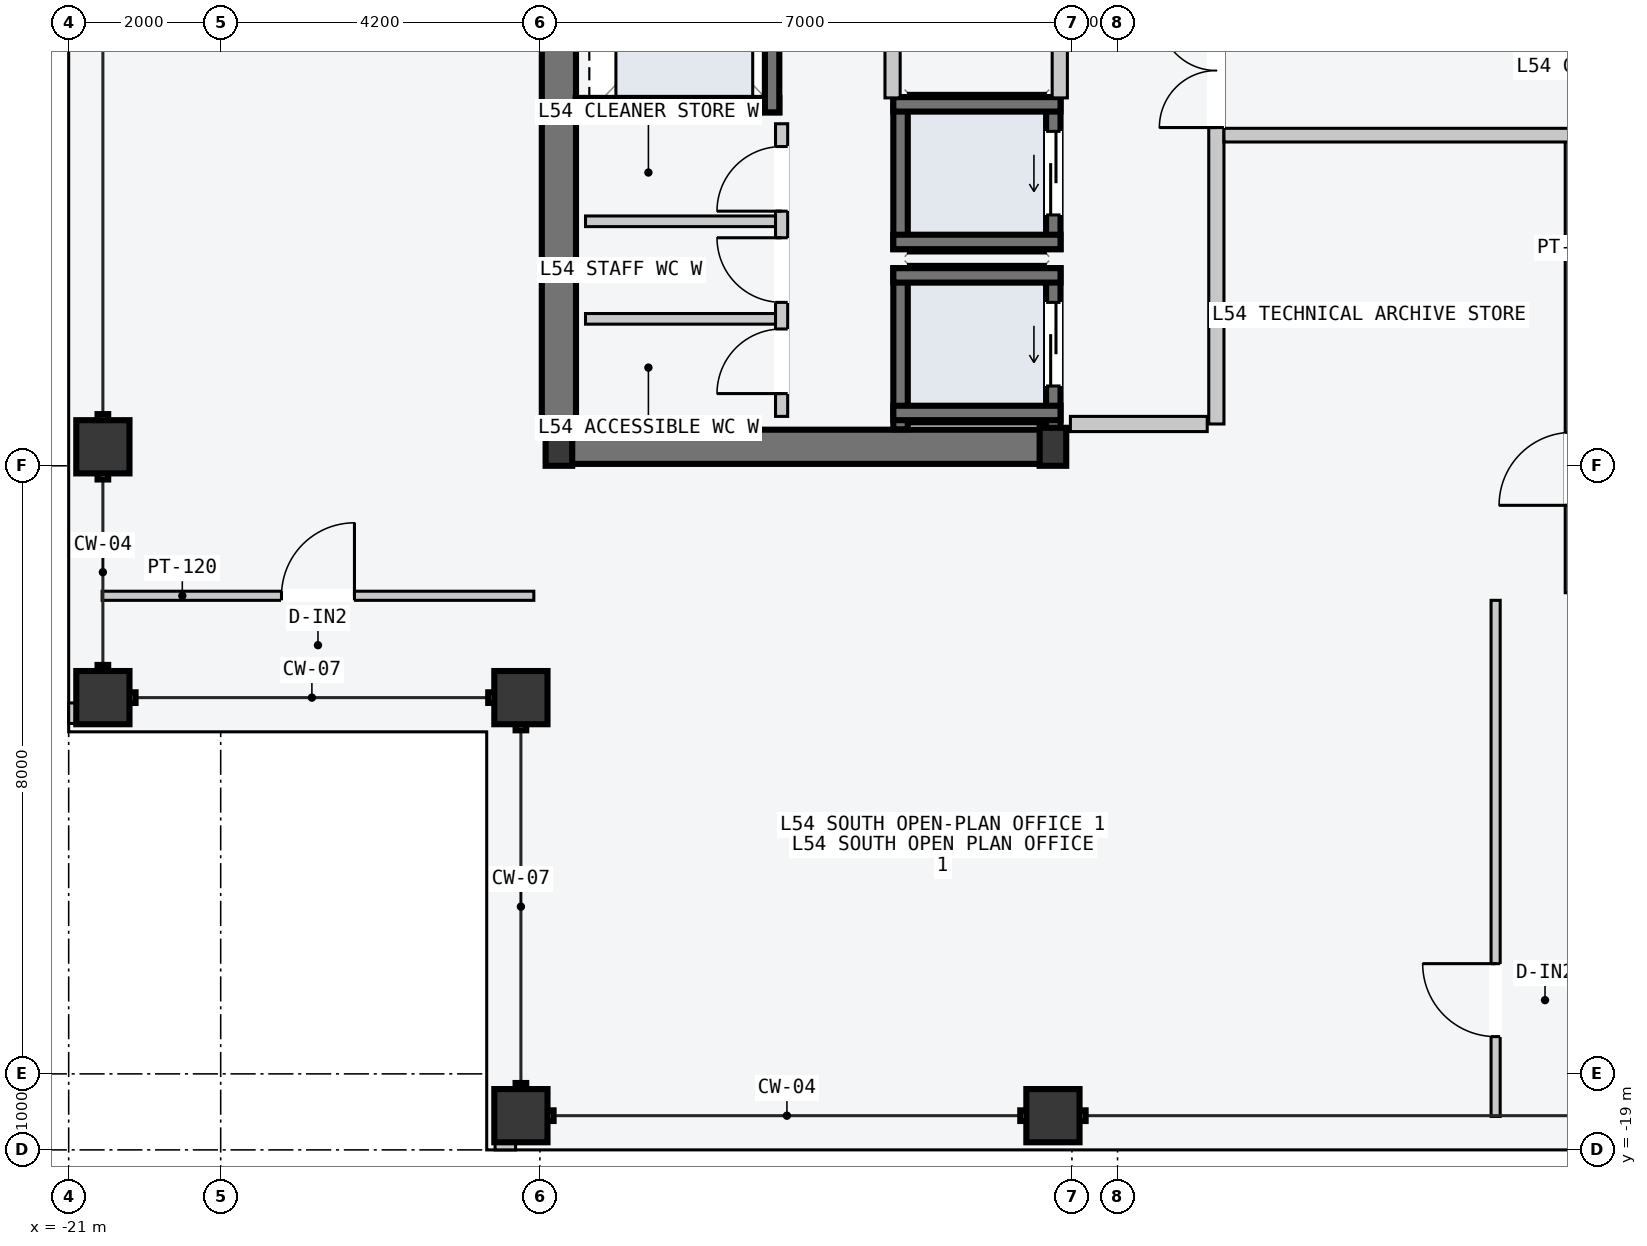
"""IFC4 building model, lengths in metres.
Left out: names, types, materials, properties, quantities, classifications, styles, units other than length and angle.
Written with IfcOpenShell. Run it as: python <this file> out.ifc"""

import sys

from ifc_helpers import new_model, si_unit, direction, frame, frame_2d, origin, origin_2d, place, context, subcontext, project, spatial, rectangle, hollow_rectangle, i_section, extrude, element, fill, save


model = new_model("IFC4")
c1 = context("Model", 3, precision=1e-05, world=origin(), true_north=direction((0.0, 1.0)))
c2 = subcontext(c1, "Body", "Model", "MODEL_VIEW")
j1 = project(units=[si_unit("LENGTHUNIT", "METRE"), si_unit("PLANEANGLEUNIT", "RADIAN")], contexts=[c1])
p1 = place(None, origin())
s1 = spatial("IfcSite", under=j1, at=p1, CompositionType="ELEMENT")
p2 = place(p1, origin())
s2 = spatial("IfcBuilding", under=s1, at=p2, CompositionType="ELEMENT")
p3 = place(p2, frame((0.0, 0.0, 205.5)))
s3 = spatial("IfcBuildingStorey", under=s2, at=p3, CompositionType="ELEMENT", Elevation=205.5)
p4 = place(p3, frame((-14.53, -9.75, -0.2), z_axis=(0.0, 0.0, 1.0), x_axis=(1.0, 0.0, 0.0)))
e1 = element("IfcWall", 1, at=p4, inside=s3, PredefinedType="SHEAR", context=c2, shape_type="SweptSolid", body=[
    extrude(rectangle(XDim=6.46, YDim=0.45, at=frame_2d((3.23, 0.0))), origin(), (0.0, 0.0, 1.0), 3.6),
])
p5 = place(p3, frame((-14.55, -9.5, -0.2), z_axis=(0.0, 0.0, 1.0), x_axis=(0.0, 1.0, 0.0)))
e2 = element("IfcWall", 2, at=p5, inside=s3, PredefinedType="SHEAR", context=c2, shape_type="SweptSolid", body=[
    extrude(rectangle(XDim=9.25, YDim=0.45, at=frame_2d((4.625, 0.0))), origin(), (0.0, 0.0, 1.0), 3.6),
])
for number, where, z_axis, x_axis in (
    (3, (-14.55, -9.75, 0.0), (0.0, 0.0, 1.0), (1.0, 0.0, 0.0)),
    (4, (-8.05, -9.75, 0.0), (0.0, 0.0, 1.0), (1.0, 0.0, 0.0)),
):
    element("IfcColumn", number, at=place(p3, frame(where, z_axis=z_axis, x_axis=x_axis)), inside=s3, PredefinedType="COLUMN", context=c2, shape_type="SweptSolid", body=[
        extrude(i_section(OverallWidth=0.35, OverallDepth=0.5, WebThickness=0.02, FlangeThickness=0.032, at=origin_2d()), origin(), (0.0, 0.0, 1.0), 3.6),
    ])
for number, where, z_axis, x_axis in (
    (5, (-15.05, -18.55, 0.0), (0.0, 0.0, 1.0), (1.0, 0.0, 0.0)),
    (6, (-8.05, -18.55, 0.0), (0.0, 0.0, 1.0), (1.0, 0.0, 0.0)),
    (7, (-20.55, -13.05, 0.0), (0.0, 0.0, 1.0), (0.0, 1.0, 0.0)),
    (8, (-20.55, -9.75, 0.0), (0.0, 0.0, 1.0), (0.0, 1.0, 0.0)),
    (9, (-15.05, -13.05, 0.0), (0.0, 0.0, 1.0), (1.0, 0.0, 0.0)),
):
    element("IfcColumn", number, at=place(p3, frame(where, z_axis=z_axis, x_axis=x_axis)), inside=s3, PredefinedType="COLUMN", context=c2, shape_type="SweptSolid", body=[
        extrude(hollow_rectangle(XDim=0.7, YDim=0.7, WallThickness=0.03, at=origin_2d()), origin(), (0.0, 0.0, 1.0), 3.6),
    ])
for number, where, z_axis, x_axis in (
    (10, (-15.39, -18.89, 0.0), (0.0, 0.0, 1.0), (1.0, 0.0, 0.0)),
    (11, (-20.89, -13.39, 0.0), (0.0, 0.0, 1.0), (0.0, 1.0, 0.0)),
):
    element("IfcWall", number, at=place(p3, frame(where, z_axis=z_axis, x_axis=x_axis)), inside=s3, PredefinedType="PARAPET", context=c2, shape_type="SweptSolid", body=[
        extrude(rectangle(XDim=0.27, YDim=0.22, at=frame_2d((0.135, 0.0))), origin(), (0.0, 0.0, 1.0), 1.2),
    ])
p6 = place(p3, frame((-8.045, -9.52, -0.2), z_axis=(0.0, 0.0, 1.0), x_axis=(0.0, 1.0, 0.0)))
e12 = element("IfcWall", 12, at=p6, inside=s3, PredefinedType="SOLIDWALL", context=c2, shape_type="SweptSolid", body=[
    extrude(rectangle(XDim=2.12, YDim=0.19, at=frame_2d((1.06, 0.0))), origin(), (0.0, 0.0, 1.0), 3.6),
])
p7 = place(p6, frame((0.57, 0.0, 0.2)))
e13 = element("IfcOpeningElement", 13, at=p7, cuts=e12, PredefinedType="OPENING", context=c2, shape_type="SweptSolid", body=[
    extrude(rectangle(XDim=1.1, YDim=2.2, at=frame_2d((0.55, 1.1))), frame((0.0, 0.105, 0.0), z_axis=(0.0, -1.0, 0.0), x_axis=(1.0, 0.0, 0.0)), (0.0, 0.0, 1.0), 0.21),
])
p8 = place(p3, frame((-10.055, -9.52, -0.2), z_axis=(0.0, 0.0, 1.0), x_axis=(0.0, 1.0, 0.0)))
e14 = element("IfcWall", 14, at=p8, inside=s3, PredefinedType="SOLIDWALL", context=c2, shape_type="SweptSolid", body=[
    extrude(rectangle(XDim=2.12, YDim=0.19, at=frame_2d((1.06, 0.0))), origin(), (0.0, 0.0, 1.0), 3.6),
])
for number, where, z_axis, x_axis in (
    (15, (-10.15, -7.495, -0.2), (0.0, 0.0, 1.0), (1.0, 0.0, 0.0)),
    (16, (-10.15, -9.305, -0.2), (0.0, 0.0, 1.0), (1.0, 0.0, 0.0)),
):
    element("IfcWall", number, at=place(p3, frame(where, z_axis=z_axis, x_axis=x_axis)), inside=s3, PredefinedType="SOLIDWALL", context=c2, shape_type="SweptSolid", body=[
        extrude(rectangle(XDim=2.2, YDim=0.19, at=frame_2d((1.1, 0.0))), origin(), (0.0, 0.0, 1.0), 3.6),
    ])
p9 = place(p3, frame((-8.045, -7.15, -0.2), z_axis=(0.0, 0.0, 1.0), x_axis=(0.0, 1.0, 0.0)))
e17 = element("IfcWall", 17, at=p9, inside=s3, PredefinedType="SOLIDWALL", context=c2, shape_type="SweptSolid", body=[
    extrude(rectangle(XDim=2.0, YDim=0.19, at=frame_2d((1.0, 0.0))), origin(), (0.0, 0.0, 1.0), 3.6),
])
p10 = place(p9, frame((0.45, 0.0, 0.2)))
e18 = element("IfcOpeningElement", 18, at=p10, cuts=e17, PredefinedType="OPENING", context=c2, shape_type="SweptSolid", body=[
    extrude(rectangle(XDim=1.1, YDim=2.2, at=frame_2d((0.55, 1.1))), frame((0.0, 0.105, 0.0), z_axis=(0.0, -1.0, 0.0), x_axis=(1.0, 0.0, 0.0)), (0.0, 0.0, 1.0), 0.21),
])
p11 = place(p3, frame((-10.055, -7.15, -0.2), z_axis=(0.0, 0.0, 1.0), x_axis=(0.0, 1.0, 0.0)))
e19 = element("IfcWall", 19, at=p11, inside=s3, PredefinedType="SOLIDWALL", context=c2, shape_type="SweptSolid", body=[
    extrude(rectangle(XDim=2.0, YDim=0.19, at=frame_2d((1.0, 0.0))), origin(), (0.0, 0.0, 1.0), 3.6),
])
for number, where, z_axis, x_axis in (
    (20, (-10.15, -5.245, -0.2), (0.0, 0.0, 1.0), (1.0, 0.0, 0.0)),
    (21, (-10.15, -7.055, -0.2), (0.0, 0.0, 1.0), (1.0, 0.0, 0.0)),
):
    element("IfcWall", number, at=place(p3, frame(where, z_axis=z_axis, x_axis=x_axis)), inside=s3, PredefinedType="SOLIDWALL", context=c2, shape_type="SweptSolid", body=[
        extrude(rectangle(XDim=2.2, YDim=0.19, at=frame_2d((1.1, 0.0))), origin(), (0.0, 0.0, 1.0), 3.6),
    ])
p12 = place(p3, frame((-14.33, -5.255, -0.2), z_axis=(0.0, 0.0, 1.0), x_axis=(1.0, 0.0, 0.0)))
e22 = element("IfcWall", 22, at=p12, inside=s3, PredefinedType="SOLIDWALL", context=c2, shape_type="SweptSolid", body=[
    extrude(rectangle(XDim=2.68, YDim=0.19, at=frame_2d((1.34, 0.0))), origin(), (0.0, 0.0, 1.0), 3.6),
])
p13 = place(p3, frame((-11.745, -5.35, -0.2), z_axis=(0.0, 0.0, 1.0), x_axis=(0.0, 1.0, 0.0)))
e23 = element("IfcWall", 23, at=p13, inside=s3, PredefinedType="SOLIDWALL", context=c2, shape_type="SweptSolid", body=[
    extrude(rectangle(XDim=2.6, YDim=0.19, at=frame_2d((1.3, 0.0))), origin(), (0.0, 0.0, 1.0), 3.6),
])
p14 = place(p3, frame((-5.9, -9.45, 0.0), z_axis=(0.0, 0.0, 1.0), x_axis=(0.0, 1.0, 0.0)))
e24 = element("IfcWall", 24, at=p14, inside=s3, PredefinedType="PARTITIONING", context=c2, shape_type="SweptSolid", body=[
    extrude(rectangle(XDim=10.5, YDim=0.2, at=frame_2d((5.25, 0.0))), origin(), (0.0, 0.0, 1.0), 3.4),
])
p15 = place(p14, frame((3.9, 0.0, 0.0)))
e25 = element("IfcOpeningElement", 25, at=p15, cuts=e24, PredefinedType="OPENING", context=c2, shape_type="SweptSolid", body=[
    extrude(rectangle(XDim=1.5, YDim=2.2, at=frame_2d((0.75, 1.1))), frame((0.0, 0.11, 0.0), z_axis=(0.0, -1.0, 0.0), x_axis=(1.0, 0.0, 0.0)), (0.0, 0.0, 1.0), 0.22),
])
p16 = place(p3, frame((-6.02, -9.45, 0.0), z_axis=(0.0, 0.0, 1.0), x_axis=(-1.0, 0.0, 0.0)))
e26 = element("IfcWall", 26, at=p16, inside=s3, PredefinedType="PARTITIONING", context=c2, shape_type="SweptSolid", body=[
    extrude(rectangle(XDim=1.8, YDim=0.2, at=frame_2d((0.9, 0.0))), origin(), (0.0, 0.0, 1.0), 3.4),
])
for number, where, z_axis, x_axis in (
    (27, (-7.96, -5.16, 0.0), (0.0, 0.0, 1.0), (0.0, 1.0, 0.0)),
    (28, (-10.16, -5.16, 0.0), (0.0, 0.0, 1.0), (0.0, 1.0, 0.0)),
):
    element("IfcWall", number, at=place(p3, frame(where, z_axis=z_axis, x_axis=x_axis)), inside=s3, PredefinedType="PARTITIONING", context=c2, shape_type="SweptSolid", body=[
        extrude(rectangle(XDim=2.44, YDim=0.2, at=frame_2d((1.22, 0.0))), origin(), (0.0, 0.0, 1.0), 3.4),
    ])
for number, where, z_axis, x_axis in (
    (29, (-11.7, -8.067, 0.0), (0.0, 0.0, 1.0), (-1.0, 0.0, 0.0)),
    (30, (-11.7, -6.783, 0.0), (0.0, 0.0, 1.0), (-1.0, 0.0, 0.0)),
):
    element("IfcWall", number, at=place(p3, frame(where, z_axis=z_axis, x_axis=x_axis)), inside=s3, PredefinedType="PARTITIONING", context=c2, shape_type="SweptSolid", body=[
        extrude(rectangle(XDim=2.5, YDim=0.14, at=frame_2d((1.25, 0.0))), origin(), (0.0, 0.0, 1.0), 3.4),
    ])
p17 = place(p3, frame((-11.62, -9.35, 0.0), z_axis=(0.0, 0.0, 1.0), x_axis=(0.0, 1.0, 0.0)))
e31 = element("IfcWall", 31, at=p17, inside=s3, PredefinedType="PARTITIONING", context=c2, shape_type="SweptSolid", body=[
    extrude(rectangle(XDim=3.85, YDim=0.16, at=frame_2d((1.925, 0.0))), origin(), (0.0, 0.0, 1.0), 3.4),
])
p18 = place(p17, frame((0.3, 0.0, 0.0)))
e32 = element("IfcOpeningElement", 32, at=p18, cuts=e31, PredefinedType="OPENING", context=c2, shape_type="SweptSolid", body=[
    extrude(rectangle(XDim=0.85, YDim=2.12, at=frame_2d((0.425, 1.06))), frame((0.0, 0.09, 0.0), z_axis=(0.0, -1.0, 0.0), x_axis=(1.0, 0.0, 0.0)), (0.0, 0.0, 1.0), 0.18),
])
p19 = place(p17, frame((1.5, 0.0, 0.0)))
e33 = element("IfcOpeningElement", 33, at=p19, cuts=e31, PredefinedType="OPENING", context=c2, shape_type="SweptSolid", body=[
    extrude(rectangle(XDim=0.85, YDim=2.12, at=frame_2d((0.425, 1.06))), frame((0.0, 0.09, 0.0), z_axis=(0.0, -1.0, 0.0), x_axis=(1.0, 0.0, 0.0)), (0.0, 0.0, 1.0), 0.18),
])
p20 = place(p17, frame((2.7, 0.0, 0.0)))
e34 = element("IfcOpeningElement", 34, at=p20, cuts=e31, PredefinedType="OPENING", context=c2, shape_type="SweptSolid", body=[
    extrude(rectangle(XDim=0.85, YDim=2.12, at=frame_2d((0.425, 1.06))), frame((0.0, 0.09, 0.0), z_axis=(0.0, -1.0, 0.0), x_axis=(1.0, 0.0, 0.0)), (0.0, 0.0, 1.0), 0.18),
])
p21 = place(p3, frame((-1.22, -11.67, 0.0), z_axis=(0.0, 0.0, 1.0), x_axis=(0.0, 1.0, 0.0)))
e35 = element("IfcWall", 35, at=p21, inside=s3, PredefinedType="PARTITIONING", context=c2, shape_type="SweptSolid", body=[
    extrude(rectangle(XDim=5.99, YDim=0.18, at=frame_2d((2.995, 0.0))), origin(), (0.0, 0.0, 1.0), 3.4),
])
p22 = place(p21, frame((1.15, 0.0, 0.0)))
e36 = element("IfcOpeningElement", 36, at=p22, cuts=e35, PredefinedType="OPENING", context=c2, shape_type="SweptSolid", body=[
    extrude(rectangle(XDim=0.96, YDim=2.18, at=frame_2d((0.48, 1.09))), frame((0.0, 0.1, 0.0), z_axis=(0.0, -1.0, 0.0), x_axis=(1.0, 0.0, 0.0)), (0.0, 0.0, 1.0), 0.2),
])
p23 = place(p3, frame((-5.8, -5.65, 0.0), z_axis=(0.0, 0.0, 1.0), x_axis=(1.0, 0.0, 0.0)))
e37 = element("IfcWall", 37, at=p23, inside=s3, PredefinedType="PARTITIONING", context=c2, shape_type="SweptSolid", body=[
    extrude(rectangle(XDim=4.54, YDim=0.18, at=frame_2d((2.27, 0.0))), origin(), (0.0, 0.0, 1.0), 3.4),
])
p24 = place(p3, frame((-2.226, -18.56, 0.0), z_axis=(0.0, 0.0, 1.0), x_axis=(0.0, 1.0, 0.0)))
e38 = element("IfcWall", 38, at=p24, inside=s3, PredefinedType="PARTITIONING", context=c2, shape_type="SweptSolid", body=[
    extrude(rectangle(XDim=6.79, YDim=0.12, at=frame_2d((3.395, 0.0))), origin(), (0.0, 0.0, 1.0), 3.4),
])
p25 = place(p24, frame((1.05, 0.0, 0.0)))
e39 = element("IfcOpeningElement", 39, at=p25, cuts=e38, PredefinedType="OPENING", context=c2, shape_type="SweptSolid", body=[
    extrude(rectangle(XDim=0.96, YDim=2.18, at=frame_2d((0.48, 1.09))), frame((0.0, 0.07, 0.0), z_axis=(0.0, -1.0, 0.0), x_axis=(1.0, 0.0, 0.0)), (0.0, 0.0, 1.0), 0.14),
])
p26 = place(p3, frame((-20.56, -11.71, 0.0), z_axis=(0.0, 0.0, 1.0), x_axis=(1.0, 0.0, 0.0)))
e40 = element("IfcWall", 40, at=p26, inside=s3, PredefinedType="PARTITIONING", context=c2, shape_type="SweptSolid", body=[
    extrude(rectangle(XDim=5.68, YDim=0.12, at=frame_2d((2.84, 0.0))), origin(), (0.0, 0.0, 1.0), 3.4),
])
p27 = place(p26, frame((2.36, 0.0, 0.0)))
e41 = element("IfcOpeningElement", 41, at=p27, cuts=e40, PredefinedType="OPENING", context=c2, shape_type="SweptSolid", body=[
    extrude(rectangle(XDim=0.96, YDim=2.18, at=frame_2d((0.48, 1.09))), frame((0.0, 0.07, 0.0), z_axis=(0.0, -1.0, 0.0), x_axis=(1.0, 0.0, 0.0)), (0.0, 0.0, 1.0), 0.14),
])
p28 = place(p7, origin())
e42 = element("IfcDoor", 42, at=p28, inside=s3, OperationType="SLIDING_TO_LEFT", PredefinedType="DOOR", context=c2, shape_type="SweptSolid", body=[
    extrude(rectangle(XDim=1.1, YDim=2.2, at=frame_2d((0.55, 1.1))), frame((0.0, 0.025, 0.0), z_axis=(0.0, -1.0, 0.0), x_axis=(1.0, 0.0, 0.0)), (0.0, 0.0, 1.0), 0.05),
])
fill(e13, e42)
p29 = place(p10, origin())
e43 = element("IfcDoor", 43, at=p29, inside=s3, OperationType="SLIDING_TO_LEFT", PredefinedType="DOOR", context=c2, shape_type="SweptSolid", body=[
    extrude(rectangle(XDim=1.1, YDim=2.2, at=frame_2d((0.55, 1.1))), frame((0.0, 0.025, 0.0), z_axis=(0.0, -1.0, 0.0), x_axis=(1.0, 0.0, 0.0)), (0.0, 0.0, 1.0), 0.05),
])
fill(e18, e43)
p30 = place(p15, origin())
e44 = element("IfcDoor", 44, at=p30, inside=s3, OperationType="DOUBLE_DOOR_SINGLE_SWING", PredefinedType="DOOR", context=c2, shape_type="SweptSolid", body=[
    extrude(rectangle(XDim=1.5, YDim=2.2, at=frame_2d((0.75, 1.1))), frame((0.0, 0.025, 0.0), z_axis=(0.0, -1.0, 0.0), x_axis=(1.0, 0.0, 0.0)), (0.0, 0.0, 1.0), 0.05),
])
fill(e25, e44)
p31 = place(p18, origin())
e45 = element("IfcDoor", 45, at=p31, inside=s3, OperationType="SINGLE_SWING_LEFT", PredefinedType="DOOR", context=c2, shape_type="SweptSolid", body=[
    extrude(rectangle(XDim=0.85, YDim=2.12, at=frame_2d((0.425, 1.06))), frame((0.0, 0.025, 0.0), z_axis=(0.0, -1.0, 0.0), x_axis=(1.0, 0.0, 0.0)), (0.0, 0.0, 1.0), 0.05),
])
fill(e32, e45)
p32 = place(p19, origin())
e46 = element("IfcDoor", 46, at=p32, inside=s3, OperationType="SINGLE_SWING_RIGHT", PredefinedType="DOOR", context=c2, shape_type="SweptSolid", body=[
    extrude(rectangle(XDim=0.85, YDim=2.12, at=frame_2d((0.425, 1.06))), frame((0.0, 0.025, 0.0), z_axis=(0.0, -1.0, 0.0), x_axis=(1.0, 0.0, 0.0)), (0.0, 0.0, 1.0), 0.05),
])
fill(e33, e46)
p33 = place(p20, origin())
e47 = element("IfcDoor", 47, at=p33, inside=s3, OperationType="SINGLE_SWING_LEFT", PredefinedType="DOOR", context=c2, shape_type="SweptSolid", body=[
    extrude(rectangle(XDim=0.85, YDim=2.12, at=frame_2d((0.425, 1.06))), frame((0.0, 0.025, 0.0), z_axis=(0.0, -1.0, 0.0), x_axis=(1.0, 0.0, 0.0)), (0.0, 0.0, 1.0), 0.05),
])
fill(e34, e47)
p34 = place(p25, origin())
e48 = element("IfcDoor", 48, at=p34, inside=s3, OperationType="SINGLE_SWING_RIGHT", PredefinedType="DOOR", context=c2, shape_type="SweptSolid", body=[
    extrude(rectangle(XDim=0.96, YDim=2.18, at=frame_2d((0.48, 1.09))), frame((0.0, 0.025, 0.0), z_axis=(0.0, -1.0, 0.0), x_axis=(1.0, 0.0, 0.0)), (0.0, 0.0, 1.0), 0.05),
])
fill(e39, e48)
p35 = place(p27, origin())
e49 = element("IfcDoor", 49, at=p35, inside=s3, OperationType="SINGLE_SWING_RIGHT", PredefinedType="DOOR", context=c2, shape_type="SweptSolid", body=[
    extrude(rectangle(XDim=0.96, YDim=2.18, at=frame_2d((0.48, 1.09))), frame((0.0, 0.025, 0.0), z_axis=(0.0, -1.0, 0.0), x_axis=(1.0, 0.0, 0.0)), (0.0, 0.0, 1.0), 0.05),
])
fill(e41, e49)
save(model, sys.argv[1])
